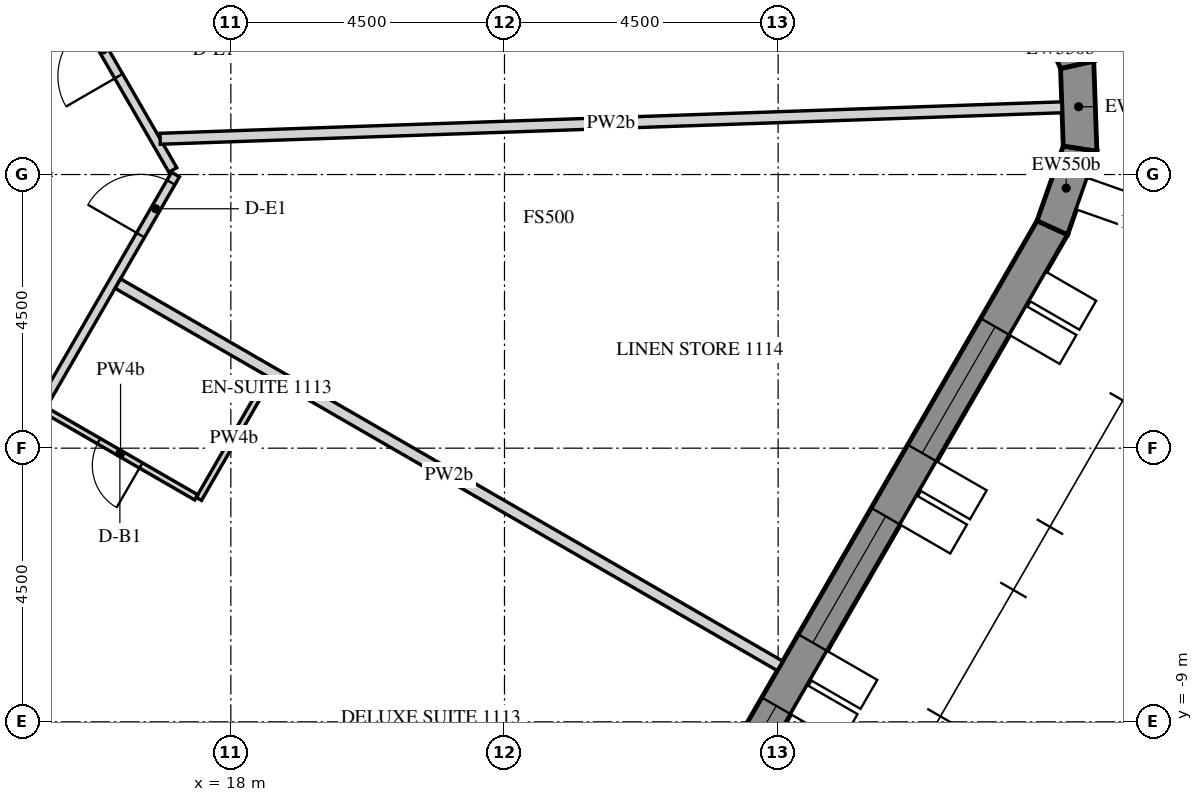
"""IFC4 building model, lengths in metres.
Left out: names, types, materials, properties, quantities, classifications, styles, units other than length and angle.
Written with IfcOpenShell. Run it as: python <this file> out.ifc"""

import sys

from ifc_helpers import new_model, si_unit, direction, frame, frame_2d, origin, place, context, subcontext, project, spatial, polyline, rectangle, outline, extrude, element, fill, save


model = new_model("IFC4")
c1 = context("Model", 3, precision=1e-05, world=origin(), true_north=direction((0.0, 1.0)))
c2 = subcontext(c1, "Body", "Model", "MODEL_VIEW")
j1 = project(units=[si_unit("LENGTHUNIT", "METRE"), si_unit("PLANEANGLEUNIT", "RADIAN")], contexts=[c1])
p1 = place(None, origin())
s1 = spatial("IfcSite", under=j1, at=p1, CompositionType="ELEMENT")
p2 = place(p1, origin())
s2 = spatial("IfcBuilding", under=s1, at=p2, CompositionType="ELEMENT")
p3 = place(p2, frame((0.0, 0.0, 152.7)))
s3 = spatial("IfcBuildingStorey", under=s2, at=p3, CompositionType="ELEMENT", Elevation=152.7)
p4 = place(p3, frame((17.63, -24.914, 0.0), z_axis=(0.0, 0.0, 1.0), x_axis=(0.499998569178, 0.866026229868, 0.0)))
e1 = element("IfcWall", 1, at=p4, inside=s3, PredefinedType="SOLIDWALL", context=c2, shape_type="SweptSolid", body=[
    extrude(outline(polyline([(-0.022, -0.275), (27.783, -0.275), (27.732, 0.275), (0.022, 0.275), (-0.022, -0.275)])), origin(), (0.0, 0.0, 1.0), 3.75),
])
p5 = place(p4, frame((1.879, 0.0, 0.9)))
e2 = element("IfcOpeningElement", 2, at=p5, cuts=e1, PredefinedType="OPENING", context=c2, shape_type="SweptSolid", body=[
    extrude(rectangle(XDim=2.4, YDim=2.4, at=frame_2d((1.2, 1.2))), frame((0.0, 0.285, 0.0), z_axis=(0.0, -1.0, 0.0), x_axis=(1.0, 0.0, 0.0)), (0.0, 0.0, 1.0), 0.57),
])
p6 = place(p4, frame((5.479, 0.0, 0.9)))
e3 = element("IfcOpeningElement", 3, at=p6, cuts=e1, PredefinedType="OPENING", context=c2, shape_type="SweptSolid", body=[
    extrude(rectangle(XDim=2.4, YDim=2.4, at=frame_2d((1.2, 1.2))), frame((0.0, 0.285, 0.0), z_axis=(0.0, -1.0, 0.0), x_axis=(1.0, 0.0, 0.0)), (0.0, 0.0, 1.0), 0.57),
])
p7 = place(p4, frame((9.079, 0.0, 0.9)))
e4 = element("IfcOpeningElement", 4, at=p7, cuts=e1, PredefinedType="OPENING", context=c2, shape_type="SweptSolid", body=[
    extrude(rectangle(XDim=2.4, YDim=2.4, at=frame_2d((1.2, 1.2))), frame((0.0, 0.285, 0.0), z_axis=(0.0, -1.0, 0.0), x_axis=(1.0, 0.0, 0.0)), (0.0, 0.0, 1.0), 0.57),
])
p8 = place(p4, frame((12.679, 0.0, 0.9)))
e5 = element("IfcOpeningElement", 5, at=p8, cuts=e1, PredefinedType="OPENING", context=c2, shape_type="SweptSolid", body=[
    extrude(rectangle(XDim=2.4, YDim=2.4, at=frame_2d((1.2, 1.2))), frame((0.0, 0.285, 0.0), z_axis=(0.0, -1.0, 0.0), x_axis=(1.0, 0.0, 0.0)), (0.0, 0.0, 1.0), 0.57),
])
p9 = place(p4, frame((16.279, 0.0, 0.9)))
e6 = element("IfcOpeningElement", 6, at=p9, cuts=e1, PredefinedType="OPENING", context=c2, shape_type="SweptSolid", body=[
    extrude(rectangle(XDim=2.4, YDim=2.4, at=frame_2d((1.2, 1.2))), frame((0.0, 0.285, 0.0), z_axis=(0.0, -1.0, 0.0), x_axis=(1.0, 0.0, 0.0)), (0.0, 0.0, 1.0), 0.57),
])
p10 = place(p4, frame((19.879, 0.0, 0.9)))
e7 = element("IfcOpeningElement", 7, at=p10, cuts=e1, PredefinedType="OPENING", context=c2, shape_type="SweptSolid", body=[
    extrude(rectangle(XDim=2.4, YDim=2.4, at=frame_2d((1.2, 1.2))), frame((0.0, 0.285, 0.0), z_axis=(0.0, -1.0, 0.0), x_axis=(1.0, 0.0, 0.0)), (0.0, 0.0, 1.0), 0.57),
])
p11 = place(p4, frame((23.479, 0.0, 0.9)))
e8 = element("IfcOpeningElement", 8, at=p11, cuts=e1, PredefinedType="OPENING", context=c2, shape_type="SweptSolid", body=[
    extrude(rectangle(XDim=2.4, YDim=2.4, at=frame_2d((1.2, 1.2))), frame((0.0, 0.285, 0.0), z_axis=(0.0, -1.0, 0.0), x_axis=(1.0, 0.0, 0.0)), (0.0, 0.0, 1.0), 0.57),
])
p12 = place(p3, frame((31.509, -0.875, 0.0), z_axis=(0.0, 0.0, 1.0), x_axis=(0.33111537203, 0.943590276765, 0.0)))
e9 = element("IfcWall", 9, at=p12, inside=s3, PredefinedType="SOLIDWALL", context=c2, shape_type="SweptSolid", body=[
    extrude(outline(polyline([(-0.026, -0.275), (1.431, -0.275), (1.327, 0.275), (0.026, 0.275), (-0.026, -0.275)])), origin(), (0.0, 0.0, 1.0), 3.75),
])
p13 = place(p3, frame((31.966, 0.426, 0.0), z_axis=(0.0, 0.0, 1.0), x_axis=(-0.034876908462, 0.999391615562, 0.0)))
e10 = element("IfcWall", 10, at=p13, inside=s3, PredefinedType="SOLIDWALL", context=c2, shape_type="SweptSolid", body=[
    extrude(outline(polyline([(-0.052, -0.275), (1.431, -0.275), (1.327, 0.275), (0.052, 0.275), (-0.052, -0.275)])), origin(), (0.0, 0.0, 1.0), 3.75),
])
p14 = place(p3, frame((31.917, 1.804, 0.0), z_axis=(0.0, 0.0, 1.0), x_axis=(-0.396225741392, 0.918153125496, 0.0)))
e11 = element("IfcWall", 11, at=p14, inside=s3, PredefinedType="SOLIDWALL", context=c2, shape_type="SweptSolid", body=[
    extrude(outline(polyline([(-0.052, -0.275), (1.405, -0.275), (1.353, 0.275), (0.052, 0.275), (-0.052, -0.275)])), origin(), (0.0, 0.0, 1.0), 3.75),
])
p15 = place(p3, frame((10.714, -11.043, 0.0), z_axis=(0.0, 0.0, 1.0), x_axis=(0.500001980452, 0.866024260367, 0.0)))
e12 = element("IfcWall", 12, at=p15, inside=s3, PredefinedType="PARTITIONING", context=c2, shape_type="SweptSolid", body=[
    extrude(rectangle(XDim=12.752, YDim=0.15, at=frame_2d((6.376, 0.0))), origin(), (0.0, 0.0, 1.0), 2.823),
])
p16 = place(p15, frame((3.625, 0.0, 0.0)))
e13 = element("IfcOpeningElement", 13, at=p16, cuts=e12, PredefinedType="OPENING", context=c2, shape_type="SweptSolid", body=[
    extrude(rectangle(XDim=1.0, YDim=2.1, at=frame_2d((0.5, 1.05))), frame((0.0, 0.085, 0.0), z_axis=(0.0, -1.0, 0.0), x_axis=(1.0, 0.0, 0.0)), (0.0, 0.0, 1.0), 0.17),
])
p17 = place(p15, frame((11.602, 0.0, 0.0)))
e14 = element("IfcOpeningElement", 14, at=p17, cuts=e12, PredefinedType="OPENING", context=c2, shape_type="SweptSolid", body=[
    extrude(rectangle(XDim=1.0, YDim=2.1, at=frame_2d((0.5, 1.05))), frame((0.0, 0.085, 0.0), z_axis=(0.0, -1.0, 0.0), x_axis=(1.0, 0.0, 0.0)), (0.0, 0.0, 1.0), 0.17),
])
p18 = place(p3, frame((17.046, 0.075, 0.0), z_axis=(0.0, 0.0, 1.0), x_axis=(-0.499999403554, 0.866025748143, 0.0)))
e15 = element("IfcWall", 15, at=p18, inside=s3, PredefinedType="PARTITIONING", context=c2, shape_type="SweptSolid", body=[
    extrude(rectangle(XDim=14.549, YDim=0.15, at=frame_2d((7.275, 0.0))), origin(), (0.0, 0.0, 1.0), 2.823),
])
p19 = place(p18, frame((1.781, 0.0, 0.0)))
e16 = element("IfcOpeningElement", 16, at=p19, cuts=e15, PredefinedType="OPENING", context=c2, shape_type="SweptSolid", body=[
    extrude(rectangle(XDim=1.0, YDim=2.1, at=frame_2d((0.5, 1.05))), frame((0.0, 0.085, 0.0), z_axis=(0.0, -1.0, 0.0), x_axis=(1.0, 0.0, 0.0)), (0.0, 0.0, 1.0), 0.17),
])
p20 = place(p18, frame((8.705, 0.0, 0.0)))
e17 = element("IfcOpeningElement", 17, at=p20, cuts=e15, PredefinedType="OPENING", context=c2, shape_type="SweptSolid", body=[
    extrude(rectangle(XDim=1.0, YDim=2.1, at=frame_2d((0.5, 1.05))), frame((0.0, 0.085, 0.0), z_axis=(0.0, -1.0, 0.0), x_axis=(1.0, 0.0, 0.0)), (0.0, 0.0, 1.0), 0.17),
])
p21 = place(p3, frame((18.629, -3.333, 0.0), z_axis=(0.0, 0.0, 1.0), x_axis=(-0.500015210774, -0.866016621662, 0.0)))
e18 = element("IfcWall", 18, at=p21, inside=s3, PredefinedType="PARTITIONING", context=c2, shape_type="SweptSolid", body=[
    extrude(rectangle(XDim=2.31, YDim=0.1, at=frame_2d((1.155, 0.0))), origin(), (0.0, 0.0, 1.0), 2.823),
])
p22 = place(p3, frame((17.431, -5.309, 0.0), z_axis=(0.0, 0.0, 1.0), x_axis=(-0.866018712932, 0.500011588718, 0.0)))
e19 = element("IfcWall", 19, at=p22, inside=s3, PredefinedType="PARTITIONING", context=c2, shape_type="SweptSolid", body=[
    extrude(rectangle(XDim=2.875, YDim=0.1, at=frame_2d((1.438, 0.0))), origin(), (0.0, 0.0, 1.0), 2.823),
])
p23 = place(p22, frame((1.05, 0.0, 0.0)))
e20 = element("IfcOpeningElement", 20, at=p23, cuts=e19, PredefinedType="OPENING", context=c2, shape_type="SweptSolid", body=[
    extrude(rectangle(XDim=0.8, YDim=2.1, at=frame_2d((0.4, 1.05))), frame((0.0, 0.06, 0.0), z_axis=(0.0, -1.0, 0.0), x_axis=(1.0, 0.0, 0.0)), (0.0, 0.0, 1.0), 0.12),
])
p24 = place(p3, frame((27.031, -8.08, 0.0), z_axis=(0.0, 0.0, 1.0), x_axis=(-0.86602780907, 0.499995833901, 0.0)))
e21 = element("IfcWall", 21, at=p24, inside=s3, PredefinedType="PARTITIONING", context=c2, shape_type="SweptSolid", body=[
    extrude(rectangle(XDim=12.575, YDim=0.18, at=frame_2d((6.287, 0.0))), origin(), (0.0, 0.0, 1.0), 2.823),
])
p25 = place(p3, frame((31.667, 1.106, 0.0), z_axis=(0.0, 0.0, 1.0), x_axis=(-0.999390937365, -0.034896336667, 0.0)))
e22 = element("IfcWall", 22, at=p25, inside=s3, PredefinedType="PARTITIONING", context=c2, shape_type="SweptSolid", body=[
    extrude(rectangle(XDim=14.839, YDim=0.18, at=frame_2d((7.419, 0.0))), origin(), (0.0, 0.0, 1.0), 2.823),
])
p26 = place(p9, frame((0.0, 0.205, 0.0)))
e23 = element("IfcWindow", 23, at=p26, inside=s3, PartitioningType="DOUBLE_PANEL_VERTICAL", PredefinedType="WINDOW", context=c2, shape_type="SweptSolid", body=[
    extrude(rectangle(XDim=2.4, YDim=2.4, at=frame_2d((1.2, 1.2))), frame((0.0, 0.03, 0.0), z_axis=(0.0, -1.0, 0.0), x_axis=(1.0, 0.0, 0.0)), (0.0, 0.0, 1.0), 0.06),
])
fill(e6, e23)
p27 = place(p10, frame((0.0, 0.205, 0.0)))
e24 = element("IfcWindow", 24, at=p27, inside=s3, PartitioningType="DOUBLE_PANEL_VERTICAL", PredefinedType="WINDOW", context=c2, shape_type="SweptSolid", body=[
    extrude(rectangle(XDim=2.4, YDim=2.4, at=frame_2d((1.2, 1.2))), frame((0.0, 0.03, 0.0), z_axis=(0.0, -1.0, 0.0), x_axis=(1.0, 0.0, 0.0)), (0.0, 0.0, 1.0), 0.06),
])
fill(e7, e24)
p28 = place(p11, frame((0.0, 0.205, 0.0)))
e25 = element("IfcWindow", 25, at=p28, inside=s3, PartitioningType="DOUBLE_PANEL_VERTICAL", PredefinedType="WINDOW", context=c2, shape_type="SweptSolid", body=[
    extrude(rectangle(XDim=2.4, YDim=2.4, at=frame_2d((1.2, 1.2))), frame((0.0, 0.03, 0.0), z_axis=(0.0, -1.0, 0.0), x_axis=(1.0, 0.0, 0.0)), (0.0, 0.0, 1.0), 0.06),
])
fill(e8, e25)
p29 = place(p23, origin())
e26 = element("IfcDoor", 26, at=p29, inside=s3, OperationType="SINGLE_SWING_LEFT", PredefinedType="DOOR", context=c2, shape_type="SweptSolid", body=[
    extrude(rectangle(XDim=0.8, YDim=2.1, at=frame_2d((0.4, 1.05))), frame((0.0, 0.025, 0.0), z_axis=(0.0, -1.0, 0.0), x_axis=(1.0, 0.0, 0.0)), (0.0, 0.0, 1.0), 0.05),
])
fill(e20, e26)
p30 = place(p17, origin())
e27 = element("IfcDoor", 27, at=p30, inside=s3, OperationType="SINGLE_SWING_LEFT", PredefinedType="DOOR", context=c2, shape_type="SweptSolid", body=[
    extrude(rectangle(XDim=1.0, YDim=2.1, at=frame_2d((0.5, 1.05))), frame((0.0, 0.025, 0.0), z_axis=(0.0, -1.0, 0.0), x_axis=(1.0, 0.0, 0.0)), (0.0, 0.0, 1.0), 0.05),
])
fill(e14, e27)
p31 = place(p19, origin())
e28 = element("IfcDoor", 28, at=p31, inside=s3, OperationType="SINGLE_SWING_LEFT", PredefinedType="DOOR", context=c2, shape_type="SweptSolid", body=[
    extrude(rectangle(XDim=1.0, YDim=2.1, at=frame_2d((0.5, 1.05))), frame((0.0, 0.025, 0.0), z_axis=(0.0, -1.0, 0.0), x_axis=(1.0, 0.0, 0.0)), (0.0, 0.0, 1.0), 0.05),
])
fill(e16, e28)
save(model, sys.argv[1])
